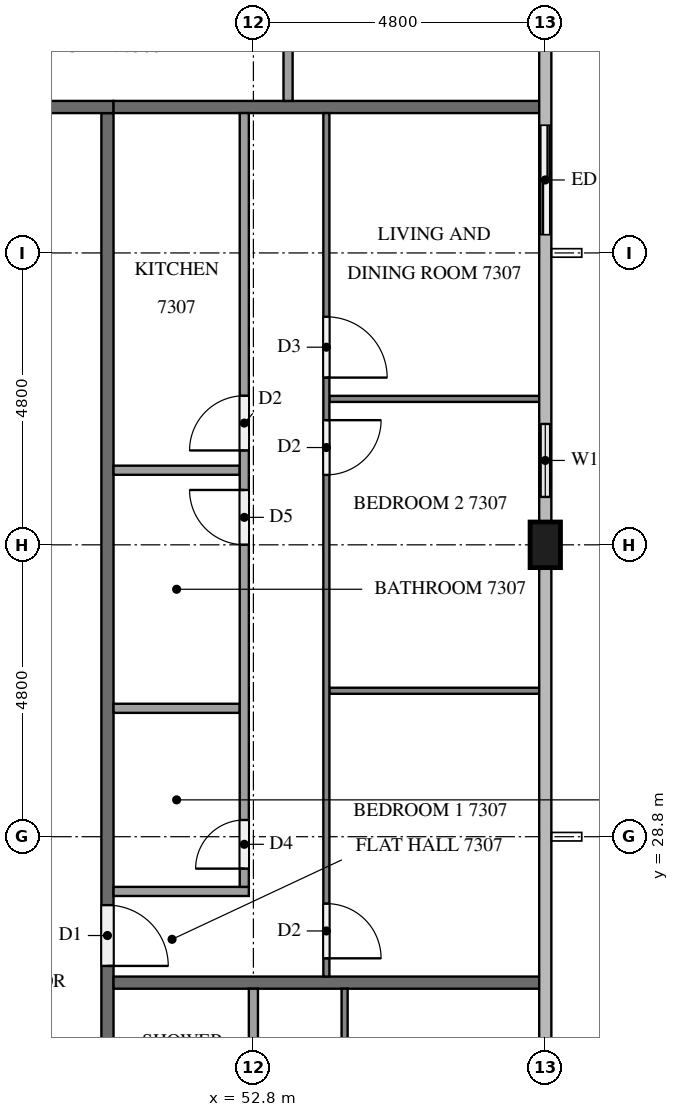
"""IFC4 building model, lengths in metres.
Left out: names, types, materials, properties, quantities, classifications, styles, units other than length and angle.
Written with IfcOpenShell. Run it as: python <this file> out.ifc"""

import sys

from ifc_helpers import new_model, si_unit, direction, frame, frame_2d, origin, origin_2d, place, context, subcontext, project, spatial, rectangle, extrude, element, fill, save


model = new_model("IFC4")
c1 = context("Model", 3, precision=1e-05, world=origin(), true_north=direction((0.0, 1.0)))
c2 = subcontext(c1, "Body", "Model", "MODEL_VIEW")
j1 = project(units=[si_unit("LENGTHUNIT", "METRE"), si_unit("PLANEANGLEUNIT", "RADIAN")], contexts=[c1])
p1 = place(None, origin())
s1 = spatial("IfcSite", under=j1, at=p1, CompositionType="ELEMENT")
p2 = place(p1, origin())
s2 = spatial("IfcBuilding", under=s1, at=p2, CompositionType="ELEMENT")
p3 = place(p2, frame((0.0, 0.0, 279.1)))
s3 = spatial("IfcBuildingStorey", under=s2, at=p3, CompositionType="ELEMENT", Elevation=279.1)
p4 = place(p3, frame((57.6, 33.6, 0.0), z_axis=(0.0, 0.0, 1.0), x_axis=(0.0, 1.0, 0.0)))
e1 = element("IfcColumn", 1, at=p4, inside=s3, PredefinedType="COLUMN", context=c2, shape_type="SweptSolid", body=[
    extrude(rectangle(XDim=0.75, YDim=0.5, at=origin_2d()), origin(), (0.0, 0.0, 1.0), 3.2),
])
p5 = place(p3, frame((57.6, 33.975, 0.0), z_axis=(0.0, 0.0, 1.0), x_axis=(0.0, 1.0, 0.0)))
e2 = element("IfcWall", 2, at=p5, inside=s3, PredefinedType="SOLIDWALL", context=c2, shape_type="SweptSolid", body=[
    extrude(rectangle(XDim=2.025, YDim=0.15, at=frame_2d((1.012, 0.0))), origin(), (0.0, 0.0, 1.0), 3.2),
])
p6 = place(p5, frame((0.413, 0.0, 0.9)))
e3 = element("IfcOpeningElement", 3, at=p6, cuts=e2, PredefinedType="OPENING", context=c2, shape_type="SweptSolid", body=[
    extrude(rectangle(XDim=1.2, YDim=1.4, at=frame_2d((0.6, 0.7))), frame((0.0, 0.085, 0.0), z_axis=(0.0, -1.0, 0.0), x_axis=(1.0, 0.0, 0.0)), (0.0, 0.0, 1.0), 0.17),
])
p7 = place(p3, frame((57.6, 38.4, 0.0), z_axis=(0.0, 0.0, 1.0), x_axis=(0.0, 1.0, 0.0)))
e4 = element("IfcWall", 4, at=p7, inside=s3, PredefinedType="SOLIDWALL", context=c2, shape_type="SweptSolid", body=[
    extrude(rectangle(XDim=2.4, YDim=0.15, at=frame_2d((1.2, 0.0))), origin(), (0.0, 0.0, 1.0), 3.2),
])
p8 = place(p7, frame((0.3, 0.0, 0.0)))
e5 = element("IfcOpeningElement", 5, at=p8, cuts=e4, PredefinedType="OPENING", context=c2, shape_type="SweptSolid", body=[
    extrude(rectangle(XDim=1.8, YDim=2.4, at=frame_2d((0.9, 1.2))), frame((0.0, 0.085, 0.0), z_axis=(0.0, -1.0, 0.0), x_axis=(1.0, 0.0, 0.0)), (0.0, 0.0, 1.0), 0.17),
])
p9 = place(p3, frame((50.4, 40.7, 0.0), z_axis=(0.0, 0.0, 1.0), x_axis=(0.0, -1.0, 0.0)))
e6 = element("IfcWall", 6, at=p9, inside=s3, PredefinedType="PARTITIONING", context=c2, shape_type="SweptSolid", body=[
    extrude(rectangle(XDim=28.6, YDim=0.2, at=frame_2d((14.3, 0.0))), origin(), (0.0, 0.0, 1.0), 3.2),
])
p10 = place(p9, frame((27.425, 0.0, 0.0)))
e7 = element("IfcOpeningElement", 7, at=p10, cuts=e6, PredefinedType="OPENING", context=c2, shape_type="SweptSolid", body=[
    extrude(rectangle(XDim=1.0, YDim=2.1, at=frame_2d((0.5, 1.05))), frame((0.0, 0.11, 0.0), z_axis=(0.0, -1.0, 0.0), x_axis=(1.0, 0.0, 0.0)), (0.0, 0.0, 1.0), 0.22),
])
p11 = place(p9, frame((13.025, 0.0, 0.0)))
e8 = element("IfcOpeningElement", 8, at=p11, cuts=e6, PredefinedType="OPENING", context=c2, shape_type="SweptSolid", body=[
    extrude(rectangle(XDim=1.0, YDim=2.1, at=frame_2d((0.5, 1.05))), frame((0.0, 0.11, 0.0), z_axis=(0.0, -1.0, 0.0), x_axis=(1.0, 0.0, 0.0)), (0.0, 0.0, 1.0), 0.22),
])
p12 = place(p3, frame((11.9, 40.8, 0.0), z_axis=(0.0, 0.0, 1.0), x_axis=(1.0, 0.0, 0.0)))
e9 = element("IfcWall", 9, at=p12, inside=s3, PredefinedType="PARTITIONING", context=c2, shape_type="SweptSolid", body=[
    extrude(rectangle(XDim=38.6, YDim=0.2, at=frame_2d((19.3, 0.0))), origin(), (0.0, 0.0, 1.0), 3.2),
])
p13 = place(p12, frame((33.975, 0.0, 0.0)))
e10 = element("IfcOpeningElement", 10, at=p13, cuts=e9, PredefinedType="OPENING", context=c2, shape_type="SweptSolid", body=[
    extrude(rectangle(XDim=1.0, YDim=2.1, at=frame_2d((0.5, 1.05))), frame((0.0, 0.11, 0.0), z_axis=(0.0, -1.0, 0.0), x_axis=(1.0, 0.0, 0.0)), (0.0, 0.0, 1.0), 0.22),
])
p14 = place(p12, frame((14.725, 0.0, 0.0)))
e11 = element("IfcOpeningElement", 11, at=p14, cuts=e9, PredefinedType="OPENING", context=c2, shape_type="SweptSolid", body=[
    extrude(rectangle(XDim=1.1, YDim=2.1, at=frame_2d((0.55, 1.05))), frame((0.0, 0.11, 0.0), z_axis=(0.0, -1.0, 0.0), x_axis=(1.0, 0.0, 0.0)), (0.0, 0.0, 1.0), 0.22),
])
p15 = place(p12, frame((13.225, 0.0, 0.0)))
e12 = element("IfcOpeningElement", 12, at=p15, cuts=e9, PredefinedType="OPENING", context=c2, shape_type="SweptSolid", body=[
    extrude(rectangle(XDim=1.0, YDim=2.1, at=frame_2d((0.5, 1.05))), frame((0.0, 0.11, 0.0), z_axis=(0.0, -1.0, 0.0), x_axis=(1.0, 0.0, 0.0)), (0.0, 0.0, 1.0), 0.22),
])
p16 = place(p12, frame((1.225, 0.0, 0.0)))
e13 = element("IfcOpeningElement", 13, at=p16, cuts=e9, PredefinedType="OPENING", context=c2, shape_type="SweptSolid", body=[
    extrude(rectangle(XDim=1.0, YDim=2.1, at=frame_2d((0.5, 1.05))), frame((0.0, 0.11, 0.0), z_axis=(0.0, -1.0, 0.0), x_axis=(1.0, 0.0, 0.0)), (0.0, 0.0, 1.0), 0.22),
])
for number, where, z_axis, x_axis in (
    (14, (50.5, 26.4, 0.0), (0.0, 0.0, 1.0), (1.0, 0.0, 0.0)),
    (15, (50.5, 40.8, 0.0), (0.0, 0.0, 1.0), (1.0, 0.0, 0.0)),
):
    element("IfcWall", number, at=place(p3, frame(where, z_axis=z_axis, x_axis=x_axis)), inside=s3, PredefinedType="PARTITIONING", context=c2, shape_type="SweptSolid", body=[
        extrude(rectangle(XDim=7.0, YDim=0.2, at=frame_2d((3.5, 0.0))), origin(), (0.0, 0.0, 1.0), 3.2),
    ])
p17 = place(p3, frame((54.3, 26.3, 0.0), z_axis=(0.0, 0.0, 1.0), x_axis=(0.0, -1.0, 0.0)))
e16 = element("IfcWall", 16, at=p17, inside=s3, PredefinedType="PARTITIONING", context=c2, shape_type="SweptSolid", body=[
    extrude(rectangle(XDim=14.2, YDim=0.1, at=frame_2d((7.1, 0.0))), origin(), (0.0, 0.0, 1.0), 3.2),
])
p18 = place(p17, frame((13.0, 0.0, 0.0)))
e17 = element("IfcOpeningElement", 17, at=p18, cuts=e16, PredefinedType="OPENING", context=c2, shape_type="SweptSolid", body=[
    extrude(rectangle(XDim=0.9, YDim=2.1, at=frame_2d((0.45, 1.05))), frame((0.0, 0.06, 0.0), z_axis=(0.0, -1.0, 0.0), x_axis=(1.0, 0.0, 0.0)), (0.0, 0.0, 1.0), 0.12),
])
p19 = place(p17, frame((5.05, 0.0, 0.0)))
e18 = element("IfcOpeningElement", 18, at=p19, cuts=e16, PredefinedType="OPENING", context=c2, shape_type="SweptSolid", body=[
    extrude(rectangle(XDim=0.9, YDim=2.1, at=frame_2d((0.45, 1.05))), frame((0.0, 0.06, 0.0), z_axis=(0.0, -1.0, 0.0), x_axis=(1.0, 0.0, 0.0)), (0.0, 0.0, 1.0), 0.12),
])
p20 = place(p17, frame((3.35, 0.0, 0.0)))
e19 = element("IfcOpeningElement", 19, at=p20, cuts=e16, PredefinedType="OPENING", context=c2, shape_type="SweptSolid", body=[
    extrude(rectangle(XDim=1.0, YDim=2.1, at=frame_2d((0.5, 1.05))), frame((0.0, 0.06, 0.0), z_axis=(0.0, -1.0, 0.0), x_axis=(1.0, 0.0, 0.0)), (0.0, 0.0, 1.0), 0.12),
])
p21 = place(p3, frame((52.8, 13.575, 0.0), z_axis=(0.0, 0.0, 1.0), x_axis=(0.0, 1.0, 0.0)))
e20 = element("IfcWall", 20, at=p21, inside=s3, PredefinedType="PARTITIONING", context=c2, shape_type="SweptSolid", body=[
    extrude(rectangle(XDim=12.725, YDim=0.15, at=frame_2d((6.363, 0.0))), origin(), (0.0, 0.0, 1.0), 3.2),
])
p22 = place(p21, frame((0.3, 0.0, 0.0)))
e21 = element("IfcOpeningElement", 21, at=p22, cuts=e20, PredefinedType="OPENING", context=c2, shape_type="SweptSolid", body=[
    extrude(rectangle(XDim=0.9, YDim=2.1, at=frame_2d((0.45, 1.05))), frame((0.0, 0.085, 0.0), z_axis=(0.0, -1.0, 0.0), x_axis=(1.0, 0.0, 0.0)), (0.0, 0.0, 1.0), 0.17),
])
p23 = place(p21, frame((8.563, 0.0, 0.0)))
e22 = element("IfcOpeningElement", 22, at=p23, cuts=e20, PredefinedType="OPENING", context=c2, shape_type="SweptSolid", body=[
    extrude(rectangle(XDim=0.9, YDim=2.1, at=frame_2d((0.45, 1.05))), frame((0.0, 0.085, 0.0), z_axis=(0.0, -1.0, 0.0), x_axis=(1.0, 0.0, 0.0)), (0.0, 0.0, 1.0), 0.17),
])
p24 = place(p21, frame((10.114, 0.0, 0.0)))
e23 = element("IfcOpeningElement", 23, at=p24, cuts=e20, PredefinedType="OPENING", context=c2, shape_type="SweptSolid", body=[
    extrude(rectangle(XDim=0.8, YDim=2.1, at=frame_2d((0.4, 1.05))), frame((0.0, 0.085, 0.0), z_axis=(0.0, -1.0, 0.0), x_axis=(1.0, 0.0, 0.0)), (0.0, 0.0, 1.0), 0.17),
])
for number, where, z_axis, x_axis in (
    (24, (54.05, 31.2, 0.0), (0.0, 0.0, 1.0), (1.0, 0.0, 0.0)),
    (25, (54.05, 36.0, 0.0), (0.0, 0.0, 1.0), (1.0, 0.0, 0.0)),
):
    element("IfcWall", number, at=place(p3, frame(where, z_axis=z_axis, x_axis=x_axis)), inside=s3, PredefinedType="PARTITIONING", context=c2, shape_type="SweptSolid", body=[
        extrude(rectangle(XDim=3.45, YDim=0.1, at=frame_2d((1.725, 0.0))), origin(), (0.0, 0.0, 1.0), 3.2),
    ])
p25 = place(p3, frame((54.0, 40.7, 0.0), z_axis=(0.0, 0.0, 1.0), x_axis=(0.0, -1.0, 0.0)))
e26 = element("IfcWall", 26, at=p25, inside=s3, PredefinedType="PARTITIONING", context=c2, shape_type="SweptSolid", body=[
    extrude(rectangle(XDim=14.2, YDim=0.1, at=frame_2d((7.1, 0.0))), origin(), (0.0, 0.0, 1.0), 3.2),
])
p26 = place(p25, frame((13.0, 0.0, 0.0)))
e27 = element("IfcOpeningElement", 27, at=p26, cuts=e26, PredefinedType="OPENING", context=c2, shape_type="SweptSolid", body=[
    extrude(rectangle(XDim=0.9, YDim=2.1, at=frame_2d((0.45, 1.05))), frame((0.0, 0.06, 0.0), z_axis=(0.0, -1.0, 0.0), x_axis=(1.0, 0.0, 0.0)), (0.0, 0.0, 1.0), 0.12),
])
p27 = place(p25, frame((5.05, 0.0, 0.0)))
e28 = element("IfcOpeningElement", 28, at=p27, cuts=e26, PredefinedType="OPENING", context=c2, shape_type="SweptSolid", body=[
    extrude(rectangle(XDim=0.9, YDim=2.1, at=frame_2d((0.45, 1.05))), frame((0.0, 0.06, 0.0), z_axis=(0.0, -1.0, 0.0), x_axis=(1.0, 0.0, 0.0)), (0.0, 0.0, 1.0), 0.12),
])
p28 = place(p25, frame((3.35, 0.0, 0.0)))
e29 = element("IfcOpeningElement", 29, at=p28, cuts=e26, PredefinedType="OPENING", context=c2, shape_type="SweptSolid", body=[
    extrude(rectangle(XDim=1.0, YDim=2.1, at=frame_2d((0.5, 1.05))), frame((0.0, 0.06, 0.0), z_axis=(0.0, -1.0, 0.0), x_axis=(1.0, 0.0, 0.0)), (0.0, 0.0, 1.0), 0.12),
])
for number, where, z_axis, x_axis in (
    (30, (50.5, 30.912, 0.0), (0.0, 0.0, 1.0), (1.0, 0.0, 0.0)),
    (31, (50.5, 34.827, 0.0), (0.0, 0.0, 1.0), (1.0, 0.0, 0.0)),
):
    element("IfcWall", number, at=place(p3, frame(where, z_axis=z_axis, x_axis=x_axis)), inside=s3, PredefinedType="PARTITIONING", context=c2, shape_type="SweptSolid", body=[
        extrude(rectangle(XDim=2.075, YDim=0.15, at=frame_2d((1.038, 0.0))), origin(), (0.0, 0.0, 1.0), 3.2),
    ])
p29 = place(p3, frame((50.5, 27.9, 0.0), z_axis=(0.0, 0.0, 1.0), x_axis=(1.0, 0.0, 0.0)))
e32 = element("IfcWall", 32, at=p29, inside=s3, PredefinedType="PARTITIONING", context=c2, shape_type="SweptSolid", body=[
    extrude(rectangle(XDim=2.225, YDim=0.15, at=frame_2d((1.113, 0.0))), origin(), (0.0, 0.0, 1.0), 3.2),
])
p30 = place(p3, frame((52.65, 27.975, 0.0), z_axis=(0.0, 0.0, 1.0), x_axis=(0.0, 1.0, 0.0)))
e33 = element("IfcWall", 33, at=p30, inside=s3, PredefinedType="PARTITIONING", context=c2, shape_type="SweptSolid", body=[
    extrude(rectangle(XDim=12.725, YDim=0.15, at=frame_2d((6.362, 0.0))), origin(), (0.0, 0.0, 1.0), 3.2),
])
p31 = place(p30, frame((0.3, 0.0, 0.0)))
e34 = element("IfcOpeningElement", 34, at=p31, cuts=e33, PredefinedType="OPENING", context=c2, shape_type="SweptSolid", body=[
    extrude(rectangle(XDim=0.8, YDim=2.1, at=frame_2d((0.4, 1.05))), frame((0.0, 0.085, 0.0), z_axis=(0.0, -1.0, 0.0), x_axis=(1.0, 0.0, 0.0)), (0.0, 0.0, 1.0), 0.17),
])
p32 = place(p30, frame((5.627, 0.0, 0.0)))
e35 = element("IfcOpeningElement", 35, at=p32, cuts=e33, PredefinedType="OPENING", context=c2, shape_type="SweptSolid", body=[
    extrude(rectangle(XDim=0.9, YDim=2.1, at=frame_2d((0.45, 1.05))), frame((0.0, 0.085, 0.0), z_axis=(0.0, -1.0, 0.0), x_axis=(1.0, 0.0, 0.0)), (0.0, 0.0, 1.0), 0.17),
])
p33 = place(p30, frame((7.177, 0.0, 0.0)))
e36 = element("IfcOpeningElement", 36, at=p33, cuts=e33, PredefinedType="OPENING", context=c2, shape_type="SweptSolid", body=[
    extrude(rectangle(XDim=0.9, YDim=2.1, at=frame_2d((0.45, 1.05))), frame((0.0, 0.085, 0.0), z_axis=(0.0, -1.0, 0.0), x_axis=(1.0, 0.0, 0.0)), (0.0, 0.0, 1.0), 0.17),
])
p34 = place(p3, frame((53.37, 40.9, 0.0), z_axis=(0.0, 0.0, 1.0), x_axis=(0.0, 1.0, 0.0)))
e37 = element("IfcWall", 37, at=p34, inside=s3, PredefinedType="PARTITIONING", context=c2, shape_type="SweptSolid", body=[
    extrude(rectangle(XDim=1.775, YDim=0.15, at=frame_2d((0.888, 0.0))), origin(), (0.0, 0.0, 1.0), 3.2),
])
p35 = place(p6, origin())
e38 = element("IfcWindow", 38, at=p35, inside=s3, PartitioningType="SINGLE_PANEL", PredefinedType="WINDOW", context=c2, shape_type="SweptSolid", body=[
    extrude(rectangle(XDim=1.2, YDim=1.4, at=frame_2d((0.6, 0.7))), frame((0.0, 0.03, 0.0), z_axis=(0.0, -1.0, 0.0), x_axis=(1.0, 0.0, 0.0)), (0.0, 0.0, 1.0), 0.06),
])
fill(e3, e38)
p36 = place(p8, origin())
e39 = element("IfcDoor", 39, at=p36, inside=s3, OperationType="SLIDING_TO_RIGHT", PredefinedType="DOOR", context=c2, shape_type="SweptSolid", body=[
    extrude(rectangle(XDim=1.8, YDim=2.4, at=frame_2d((0.9, 1.2))), frame((0.0, 0.025, 0.0), z_axis=(0.0, -1.0, 0.0), x_axis=(1.0, 0.0, 0.0)), (0.0, 0.0, 1.0), 0.05),
])
fill(e5, e39)
p37 = place(p11, origin())
e40 = element("IfcDoor", 40, at=p37, inside=s3, OperationType="SINGLE_SWING_RIGHT", PredefinedType="DOOR", context=c2, shape_type="SweptSolid", body=[
    extrude(rectangle(XDim=1.0, YDim=2.1, at=frame_2d((0.5, 1.05))), frame((0.0, 0.025, 0.0), z_axis=(0.0, -1.0, 0.0), x_axis=(1.0, 0.0, 0.0)), (0.0, 0.0, 1.0), 0.05),
])
fill(e8, e40)
p38 = place(p26, origin())
e41 = element("IfcDoor", 41, at=p38, inside=s3, OperationType="SINGLE_SWING_RIGHT", PredefinedType="DOOR", context=c2, shape_type="SweptSolid", body=[
    extrude(rectangle(XDim=0.9, YDim=2.1, at=frame_2d((0.45, 1.05))), frame((0.0, 0.025, 0.0), z_axis=(0.0, -1.0, 0.0), x_axis=(1.0, 0.0, 0.0)), (0.0, 0.0, 1.0), 0.05),
])
fill(e27, e41)
p39 = place(p27, origin())
e42 = element("IfcDoor", 42, at=p39, inside=s3, OperationType="SINGLE_SWING_LEFT", PredefinedType="DOOR", context=c2, shape_type="SweptSolid", body=[
    extrude(rectangle(XDim=0.9, YDim=2.1, at=frame_2d((0.45, 1.05))), frame((0.0, 0.025, 0.0), z_axis=(0.0, -1.0, 0.0), x_axis=(1.0, 0.0, 0.0)), (0.0, 0.0, 1.0), 0.05),
])
fill(e28, e42)
p40 = place(p28, origin())
e43 = element("IfcDoor", 43, at=p40, inside=s3, OperationType="SINGLE_SWING_RIGHT", PredefinedType="DOOR", context=c2, shape_type="SweptSolid", body=[
    extrude(rectangle(XDim=1.0, YDim=2.1, at=frame_2d((0.5, 1.05))), frame((0.0, 0.025, 0.0), z_axis=(0.0, -1.0, 0.0), x_axis=(1.0, 0.0, 0.0)), (0.0, 0.0, 1.0), 0.05),
])
fill(e29, e43)
p41 = place(p31, origin())
e44 = element("IfcDoor", 44, at=p41, inside=s3, OperationType="SINGLE_SWING_LEFT", PredefinedType="DOOR", context=c2, shape_type="SweptSolid", body=[
    extrude(rectangle(XDim=0.8, YDim=2.1, at=frame_2d((0.4, 1.05))), frame((0.0, 0.025, 0.0), z_axis=(0.0, -1.0, 0.0), x_axis=(1.0, 0.0, 0.0)), (0.0, 0.0, 1.0), 0.05),
])
fill(e34, e44)
p42 = place(p32, origin())
e45 = element("IfcDoor", 45, at=p42, inside=s3, OperationType="SINGLE_SWING_RIGHT", PredefinedType="DOOR", context=c2, shape_type="SweptSolid", body=[
    extrude(rectangle(XDim=0.9, YDim=2.1, at=frame_2d((0.45, 1.05))), frame((0.0, 0.025, 0.0), z_axis=(0.0, -1.0, 0.0), x_axis=(1.0, 0.0, 0.0)), (0.0, 0.0, 1.0), 0.05),
])
fill(e35, e45)
p43 = place(p33, origin())
e46 = element("IfcDoor", 46, at=p43, inside=s3, OperationType="SINGLE_SWING_LEFT", PredefinedType="DOOR", context=c2, shape_type="SweptSolid", body=[
    extrude(rectangle(XDim=0.9, YDim=2.1, at=frame_2d((0.45, 1.05))), frame((0.0, 0.025, 0.0), z_axis=(0.0, -1.0, 0.0), x_axis=(1.0, 0.0, 0.0)), (0.0, 0.0, 1.0), 0.05),
])
fill(e36, e46)
save(model, sys.argv[1])
